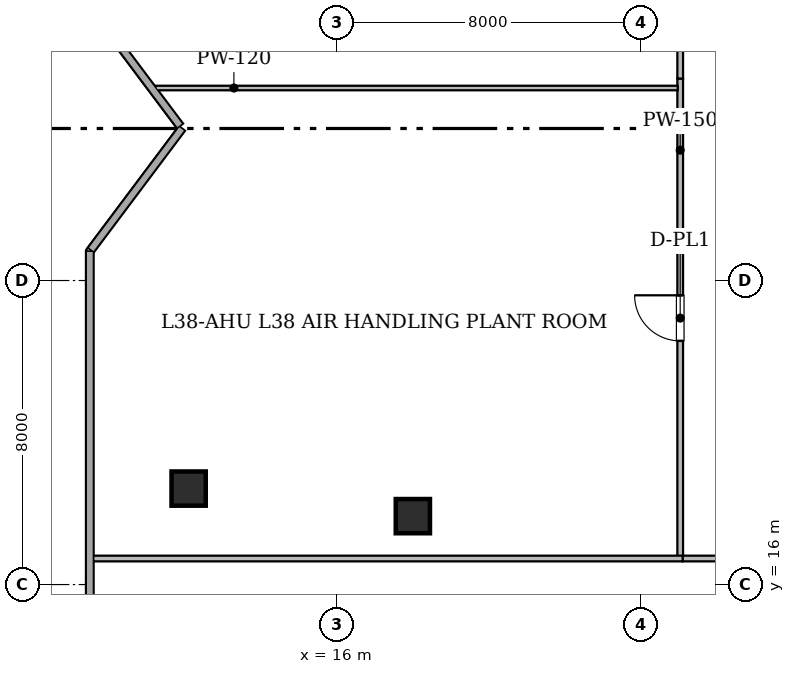
"""IFC4 building model, lengths in metres.
Left out: names, types, materials, properties, quantities, classifications, styles, units other than length and angle.
Written with IfcOpenShell. Run it as: python <this file> out.ifc"""

import sys

from ifc_helpers import new_model, si_unit, direction, frame, frame_2d, origin, origin_2d, place, context, subcontext, project, spatial, rectangle, hollow_rectangle, extrude, element, fill, save


model = new_model("IFC4")
c1 = context("Model", 3, precision=1e-05, world=origin(), true_north=direction((0.0, 1.0)))
c2 = subcontext(c1, "Body", "Model", "MODEL_VIEW")
j1 = project(units=[si_unit("LENGTHUNIT", "METRE"), si_unit("PLANEANGLEUNIT", "RADIAN")], contexts=[c1])
p1 = place(None, origin())
s1 = spatial("IfcSite", under=j1, at=p1, CompositionType="ELEMENT")
p2 = place(p1, origin())
s2 = spatial("IfcBuilding", under=s1, at=p2, CompositionType="ELEMENT")
p3 = place(p2, frame((0.0, 0.0, 150.5)))
s3 = spatial("IfcBuildingStorey", under=s2, at=p3, CompositionType="ELEMENT", Elevation=150.5)
for number, where, z_axis, x_axis in (
    (1, (12.1, 18.525, 0.0), (0.0, 0.0, 1.0), (1.0, 0.0, 0.0)),
    (2, (18.0, 17.8, 0.0), (0.0, 0.0, 1.0), (1.0, 0.0, 0.0)),
):
    element("IfcColumn", number, at=place(p3, frame(where, z_axis=z_axis, x_axis=x_axis)), inside=s3, PredefinedType="COLUMN", context=c2, shape_type="SweptSolid", body=[
        extrude(hollow_rectangle(XDim=0.9, YDim=0.9, WallThickness=0.045, at=origin_2d()), origin(), (0.0, 0.0, 1.0), 5.375),
    ])
p4 = place(p3, frame((9.5, 10.704, 0.0), z_axis=(0.0, 0.0, 1.0), x_axis=(0.0, 1.0, 0.0)))
e3 = element("IfcWall", 3, at=p4, inside=s3, PredefinedType="STANDARD", context=c2, shape_type="SweptSolid", body=[
    extrude(rectangle(XDim=14.063, YDim=0.2, at=frame_2d((7.031, 0.0))), origin(), (0.0, 0.0, 1.0), 1.15),
])
p5 = place(p3, frame((9.53, 24.807, 0.0), z_axis=(0.0, 0.0, 1.0), x_axis=(0.600029358831, 0.799977980035, 0.0)))
e4 = element("IfcWall", 4, at=p5, inside=s3, PredefinedType="STANDARD", context=c2, shape_type="SweptSolid", body=[
    extrude(rectangle(XDim=3.991, YDim=0.2, at=frame_2d((1.996, 0.0))), origin(), (0.0, 0.0, 1.0), 1.15),
])
p6 = place(p3, frame((11.873, 28.069, 0.0), z_axis=(0.0, 0.0, 1.0), x_axis=(-0.600029630681, 0.799977776132, 0.0)))
e5 = element("IfcWall", 5, at=p6, inside=s3, PredefinedType="STANDARD", context=c2, shape_type="SweptSolid", body=[
    extrude(rectangle(XDim=3.955, YDim=0.2, at=frame_2d((1.978, 0.0))), origin(), (0.0, 0.0, 1.0), 1.15),
])
p7 = place(p3, frame((43.8, 16.685, 0.0), z_axis=(0.0, 0.0, 1.0), x_axis=(-1.0, 0.0, 0.0)))
e6 = element("IfcWall", 6, at=p7, inside=s3, PredefinedType="STANDARD", context=c2, shape_type="SweptSolid", body=[
    extrude(rectangle(XDim=18.7, YDim=0.15, at=frame_2d((9.35, 0.0))), origin(), (0.0, 0.0, 1.0), 3.42),
])
p8 = place(p7, frame((8.75, 0.0, 0.0)))
e7 = element("IfcOpeningElement", 7, at=p8, cuts=e6, PredefinedType="OPENING", context=c2, shape_type="SweptSolid", body=[
    extrude(rectangle(XDim=1.2, YDim=2.15, at=frame_2d((0.6, 1.075))), frame((0.0, 0.085, 0.0), z_axis=(0.0, -1.0, 0.0), x_axis=(1.0, 0.0, 0.0)), (0.0, 0.0, 1.0), 0.17),
])
p9 = place(p3, frame((25.035, 16.75, 0.0), z_axis=(0.0, 0.0, 1.0), x_axis=(0.0, 1.0, 0.0)))
e8 = element("IfcWall", 8, at=p9, inside=s3, PredefinedType="STANDARD", context=c2, shape_type="SweptSolid", body=[
    extrude(rectangle(XDim=12.564, YDim=0.15, at=frame_2d((6.282, 0.0))), origin(), (0.0, 0.0, 1.0), 3.42),
])
p10 = place(p9, frame((5.661, 0.0, 0.0)))
e9 = element("IfcOpeningElement", 9, at=p10, cuts=e8, PredefinedType="OPENING", context=c2, shape_type="SweptSolid", body=[
    extrude(rectangle(XDim=1.2, YDim=2.15, at=frame_2d((0.6, 1.075))), frame((0.0, 0.085, 0.0), z_axis=(0.0, -1.0, 0.0), x_axis=(1.0, 0.0, 0.0)), (0.0, 0.0, 1.0), 0.17),
])
p11 = place(p3, frame((25.035, 29.314, 0.0), z_axis=(0.0, 0.0, 1.0), x_axis=(0.0, 1.0, 0.0)))
e10 = element("IfcWall", 10, at=p11, inside=s3, PredefinedType="STANDARD", context=c2, shape_type="SweptSolid", body=[
    extrude(rectangle(XDim=11.186, YDim=0.15, at=frame_2d((5.593, 0.0))), origin(), (0.0, 0.0, 1.0), 3.42),
])
p12 = place(p11, frame((4.993, 0.0, 0.0)))
e11 = element("IfcOpeningElement", 11, at=p12, cuts=e10, PredefinedType="OPENING", context=c2, shape_type="SweptSolid", body=[
    extrude(rectangle(XDim=1.2, YDim=2.15, at=frame_2d((0.6, 1.075))), frame((0.0, 0.085, 0.0), z_axis=(0.0, -1.0, 0.0), x_axis=(1.0, 0.0, 0.0)), (0.0, 0.0, 1.0), 0.17),
])
p13 = place(p3, frame((9.592, 16.685, 0.0), z_axis=(0.0, 0.0, 1.0), x_axis=(1.0, 0.0, 0.0)))
e12 = element("IfcWall", 12, at=p13, inside=s3, PredefinedType="STANDARD", context=c2, shape_type="SweptSolid", body=[
    extrude(rectangle(XDim=15.508, YDim=0.15, at=frame_2d((7.754, 0.0))), origin(), (0.0, 0.0, 1.0), 3.42),
])
p14 = place(p3, frame((11.23, 29.065, 0.0), z_axis=(0.0, 0.0, 1.0), x_axis=(1.0, 0.0, 0.0)))
e13 = element("IfcWall", 13, at=p14, inside=s3, PredefinedType="PARTITIONING", context=c2, shape_type="SweptSolid", body=[
    extrude(rectangle(XDim=13.74, YDim=0.12, at=frame_2d((6.87, 0.0))), origin(), (0.0, 0.0, 1.0), 3.42),
])
p15 = place(p10, origin())
e14 = element("IfcDoor", 14, at=p15, inside=s3, OperationType="SINGLE_SWING_RIGHT", PredefinedType="DOOR", context=c2, shape_type="SweptSolid", body=[
    extrude(rectangle(XDim=1.2, YDim=2.15, at=frame_2d((0.6, 1.075))), frame((0.0, 0.025, 0.0), z_axis=(0.0, -1.0, 0.0), x_axis=(1.0, 0.0, 0.0)), (0.0, 0.0, 1.0), 0.05),
])
fill(e9, e14)
save(model, sys.argv[1])
